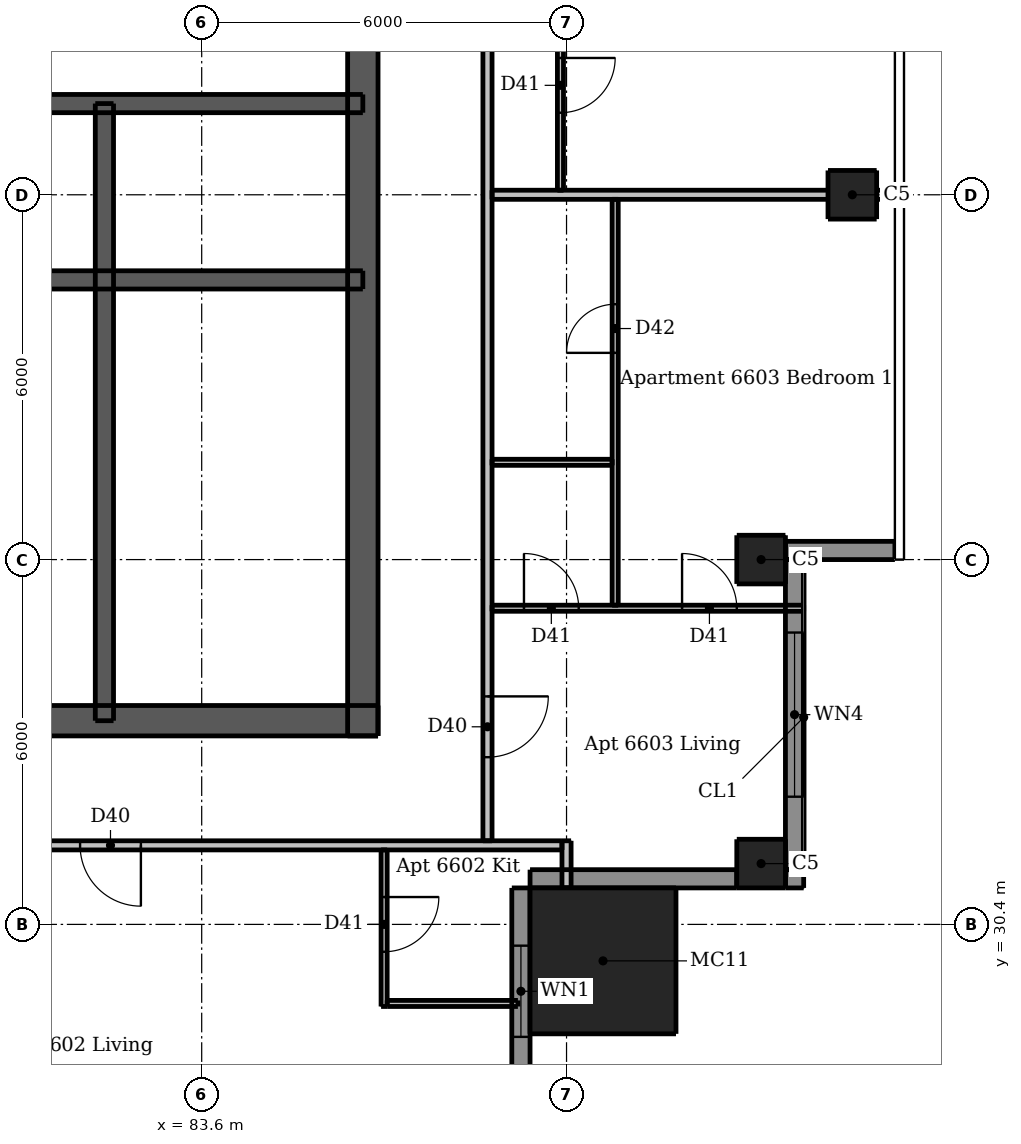
"""IFC4 building model, lengths in metres.
Left out: names, types, materials, properties, quantities, classifications, styles, units other than length and angle.
Written with IfcOpenShell. Run it as: python <this file> out.ifc"""

import sys

from ifc_helpers import new_model, si_unit, direction, frame, frame_2d, origin, origin_2d, place, context, subcontext, project, spatial, rectangle, extrude, element, fill, save


model = new_model("IFC4")
c1 = context("Model", 3, precision=1e-05, world=origin(), true_north=direction((0.0, 1.0)))
c2 = subcontext(c1, "Body", "Model", "MODEL_VIEW")
j1 = project(units=[si_unit("LENGTHUNIT", "METRE"), si_unit("PLANEANGLEUNIT", "RADIAN")], contexts=[c1])
p1 = place(None, origin())
s1 = spatial("IfcSite", under=j1, at=p1, CompositionType="ELEMENT")
p2 = place(p1, origin())
s2 = spatial("IfcBuilding", under=s1, at=p2, CompositionType="ELEMENT")
p3 = place(p2, frame((0.0, 0.0, 248.8)))
s3 = spatial("IfcBuildingStorey", under=s2, at=p3, CompositionType="ELEMENT", Elevation=248.8)
p4 = place(p3, frame((62.5, 33.75, 0.0), z_axis=(0.0, 0.0, 1.0), x_axis=(1.0, 0.0, 0.0)))
e1 = element("IfcWall", 1, at=p4, inside=s3, PredefinedType="SHEAR", context=c2, shape_type="SweptSolid", body=[
    extrude(rectangle(XDim=24.0, YDim=0.5, at=frame_2d((12.0, 0.0))), origin(), (0.0, 0.0, 1.0), 3.05),
])
p5 = place(p4, frame((1.875, 0.0, 0.0)))
e2 = element("IfcOpeningElement", 2, at=p5, cuts=e1, PredefinedType="OPENING", context=c2, shape_type="SweptSolid", body=[
    extrude(rectangle(XDim=1.1, YDim=2.1, at=frame_2d((0.55, 1.05))), frame((0.0, 0.26, 0.0), z_axis=(0.0, -1.0, 0.0), x_axis=(1.0, 0.0, 0.0)), (0.0, 0.0, 1.0), 0.52),
])
p6 = place(p4, frame((21.025, 0.0, 0.0)))
e3 = element("IfcOpeningElement", 3, at=p6, cuts=e1, PredefinedType="OPENING", context=c2, shape_type="SweptSolid", body=[
    extrude(rectangle(XDim=1.1, YDim=2.1, at=frame_2d((0.55, 1.05))), frame((0.0, 0.26, 0.0), z_axis=(0.0, -1.0, 0.0), x_axis=(1.0, 0.0, 0.0)), (0.0, 0.0, 1.0), 0.52),
])
p7 = place(p4, frame((8.0, 0.0, 0.0)))
e4 = element("IfcOpeningElement", 4, at=p7, cuts=e1, PredefinedType="OPENING", context=c2, shape_type="SweptSolid", body=[
    extrude(rectangle(XDim=1.1, YDim=2.1, at=frame_2d((0.55, 1.05))), frame((0.0, 0.26, 0.0), z_axis=(0.0, -1.0, 0.0), x_axis=(1.0, 0.0, 0.0)), (0.0, 0.0, 1.0), 0.52),
])
p8 = place(p4, frame((17.512, 0.0, 0.0)))
e5 = element("IfcOpeningElement", 5, at=p8, cuts=e1, PredefinedType="OPENING", context=c2, shape_type="SweptSolid", body=[
    extrude(rectangle(XDim=0.9, YDim=2.1, at=frame_2d((0.45, 1.05))), frame((0.0, 0.26, 0.0), z_axis=(0.0, -1.0, 0.0), x_axis=(1.0, 0.0, 0.0)), (0.0, 0.0, 1.0), 0.52),
])
p9 = place(p3, frame((86.25, 33.5, 0.0), z_axis=(0.0, 0.0, 1.0), x_axis=(0.0, 1.0, 0.0)))
e6 = element("IfcWall", 6, at=p9, inside=s3, PredefinedType="SHEAR", context=c2, shape_type="SweptSolid", body=[
    extrude(rectangle(XDim=24.0, YDim=0.5, at=frame_2d((12.0, 0.0))), origin(), (0.0, 0.0, 1.0), 3.05),
])
p10 = place(p9, frame((11.2, 0.0, 0.0)))
e7 = element("IfcOpeningElement", 7, at=p10, cuts=e6, PredefinedType="OPENING", context=c2, shape_type="SweptSolid", body=[
    extrude(rectangle(XDim=1.6, YDim=2.1, at=frame_2d((0.8, 1.05))), frame((0.0, 0.26, 0.0), z_axis=(0.0, -1.0, 0.0), x_axis=(1.0, 0.0, 0.0)), (0.0, 0.0, 1.0), 0.52),
])
p11 = place(p3, frame((62.75, 41.0, 0.0), z_axis=(0.0, 0.0, 1.0), x_axis=(1.0, 0.0, 0.0)))
e8 = element("IfcWall", 8, at=p11, inside=s3, PredefinedType="SHEAR", context=c2, shape_type="SweptSolid", body=[
    extrude(rectangle(XDim=23.5, YDim=0.3, at=frame_2d((11.75, 0.0))), origin(), (0.0, 0.0, 1.0), 3.05),
])
p12 = place(p3, frame((62.75, 43.9, 0.0), z_axis=(0.0, 0.0, 1.0), x_axis=(1.0, 0.0, 0.0)))
e9 = element("IfcWall", 9, at=p12, inside=s3, PredefinedType="SHEAR", context=c2, shape_type="SweptSolid", body=[
    extrude(rectangle(XDim=23.5, YDim=0.3, at=frame_2d((11.75, 0.0))), origin(), (0.0, 0.0, 1.0), 3.05),
])
p13 = place(p12, frame((0.762, 0.0, 0.0)))
e10 = element("IfcOpeningElement", 10, at=p13, cuts=e9, PredefinedType="OPENING", context=c2, shape_type="SweptSolid", body=[
    extrude(rectangle(XDim=0.9, YDim=2.1, at=frame_2d((0.45, 1.05))), frame((0.0, 0.16, 0.0), z_axis=(0.0, -1.0, 0.0), x_axis=(1.0, 0.0, 0.0)), (0.0, 0.0, 1.0), 0.32),
])
p14 = place(p12, frame((2.688, 0.0, 0.0)))
e11 = element("IfcOpeningElement", 11, at=p14, cuts=e9, PredefinedType="OPENING", context=c2, shape_type="SweptSolid", body=[
    extrude(rectangle(XDim=0.9, YDim=2.1, at=frame_2d((0.45, 1.05))), frame((0.0, 0.16, 0.0), z_axis=(0.0, -1.0, 0.0), x_axis=(1.0, 0.0, 0.0)), (0.0, 0.0, 1.0), 0.32),
])
p15 = place(p12, frame((20.875, 0.0, 0.0)))
e12 = element("IfcOpeningElement", 12, at=p15, cuts=e9, PredefinedType="OPENING", context=c2, shape_type="SweptSolid", body=[
    extrude(rectangle(XDim=0.9, YDim=2.1, at=frame_2d((0.45, 1.05))), frame((0.0, 0.16, 0.0), z_axis=(0.0, -1.0, 0.0), x_axis=(1.0, 0.0, 0.0)), (0.0, 0.0, 1.0), 0.32),
])
p16 = place(p12, frame((5.05, 0.0, 0.0)))
e13 = element("IfcOpeningElement", 13, at=p16, cuts=e9, PredefinedType="OPENING", context=c2, shape_type="SweptSolid", body=[
    extrude(rectangle(XDim=0.9, YDim=2.1, at=frame_2d((0.45, 1.05))), frame((0.0, 0.16, 0.0), z_axis=(0.0, -1.0, 0.0), x_axis=(1.0, 0.0, 0.0)), (0.0, 0.0, 1.0), 0.32),
])
p17 = place(p12, frame((7.55, 0.0, 0.0)))
e14 = element("IfcOpeningElement", 14, at=p17, cuts=e9, PredefinedType="OPENING", context=c2, shape_type="SweptSolid", body=[
    extrude(rectangle(XDim=0.9, YDim=2.1, at=frame_2d((0.45, 1.05))), frame((0.0, 0.16, 0.0), z_axis=(0.0, -1.0, 0.0), x_axis=(1.0, 0.0, 0.0)), (0.0, 0.0, 1.0), 0.32),
])
p18 = place(p12, frame((12.55, 0.0, 0.0)))
e15 = element("IfcOpeningElement", 15, at=p18, cuts=e9, PredefinedType="OPENING", context=c2, shape_type="SweptSolid", body=[
    extrude(rectangle(XDim=0.9, YDim=2.1, at=frame_2d((0.45, 1.05))), frame((0.0, 0.16, 0.0), z_axis=(0.0, -1.0, 0.0), x_axis=(1.0, 0.0, 0.0)), (0.0, 0.0, 1.0), 0.32),
])
p19 = place(p12, frame((15.05, 0.0, 0.0)))
e16 = element("IfcOpeningElement", 16, at=p19, cuts=e9, PredefinedType="OPENING", context=c2, shape_type="SweptSolid", body=[
    extrude(rectangle(XDim=0.9, YDim=2.1, at=frame_2d((0.45, 1.05))), frame((0.0, 0.16, 0.0), z_axis=(0.0, -1.0, 0.0), x_axis=(1.0, 0.0, 0.0)), (0.0, 0.0, 1.0), 0.32),
])
p20 = place(p3, frame((82.0, 33.75, 0.0), z_axis=(0.0, 0.0, 1.0), x_axis=(0.0, 1.0, 0.0)))
e17 = element("IfcWall", 17, at=p20, inside=s3, PredefinedType="SHEAR", context=c2, shape_type="SweptSolid", body=[
    extrude(rectangle(XDim=10.15, YDim=0.3, at=frame_2d((5.075, 0.0))), origin(), (0.0, 0.0, 1.0), 3.05),
])
for number, where, z_axis, x_axis in (
    (18, (92.8, 31.4, 0.0), (0.0, 0.0, 1.0), (1.0, 0.0, 0.0)),
    (19, (92.8, 36.4, 0.0), (0.0, 0.0, 1.0), (1.0, 0.0, 0.0)),
    (20, (94.3, 42.4, 0.0), (0.0, 0.0, 1.0), (1.0, 0.0, 0.0)),
):
    element("IfcColumn", number, at=place(p3, frame(where, z_axis=z_axis, x_axis=x_axis)), inside=s3, PredefinedType="COLUMN", context=c2, shape_type="SweptSolid", body=[
        extrude(rectangle(XDim=0.8, YDim=0.8, at=origin_2d()), origin(), (0.0, 0.0, 1.0), 3.05),
    ])
p21 = place(p3, frame((90.2, 29.8, 0.0), z_axis=(0.0, 0.0, 1.0), x_axis=(1.0, 0.0, 0.0)))
e21 = element("IfcColumn", 21, at=p21, inside=s3, PredefinedType="COLUMN", context=c2, shape_type="SweptSolid", body=[
    extrude(rectangle(XDim=2.4, YDim=2.4, at=origin_2d()), origin(), (0.0, 0.0, 1.0), 3.3),
])
p22 = place(p3, frame((88.85, 27.6, 0.0), z_axis=(0.0, 0.0, 1.0), x_axis=(0.0, 1.0, 0.0)))
e22 = element("IfcWall", 22, at=p22, inside=s3, PredefinedType="SOLIDWALL", context=c2, shape_type="SweptSolid", body=[
    extrude(rectangle(XDim=3.4, YDim=0.3, at=frame_2d((1.7, 0.0))), origin(), (0.0, 0.0, 1.0), 3.05),
])
p23 = place(p22, frame((0.95, 0.0, 0.9)))
e23 = element("IfcOpeningElement", 23, at=p23, cuts=e22, PredefinedType="OPENING", context=c2, shape_type="SweptSolid", body=[
    extrude(rectangle(XDim=1.5, YDim=1.5, at=frame_2d((0.75, 0.75))), frame((0.0, 0.16, 0.0), z_axis=(0.0, -1.0, 0.0), x_axis=(1.0, 0.0, 0.0)), (0.0, 0.0, 1.0), 0.32),
])
p24 = place(p3, frame((89.0, 31.15, 0.0), z_axis=(0.0, 0.0, 1.0), x_axis=(1.0, 0.0, 0.0)))
e24 = element("IfcWall", 24, at=p24, inside=s3, PredefinedType="SOLIDWALL", context=c2, shape_type="SweptSolid", body=[
    extrude(rectangle(XDim=3.4, YDim=0.3, at=frame_2d((1.7, 0.0))), origin(), (0.0, 0.0, 1.0), 3.05),
])
p25 = place(p3, frame((93.2, 31.15, 0.0), z_axis=(0.0, 0.0, 1.0), x_axis=(1.0, 0.0, 0.0)))
e25 = element("IfcWall", 25, at=p25, inside=s3, PredefinedType="SOLIDWALL", context=c2, shape_type="SweptSolid", body=[
    extrude(rectangle(XDim=0.3, YDim=0.3, at=frame_2d((0.15, 0.0))), origin(), (0.0, 0.0, 1.0), 3.05),
])
p26 = place(p3, frame((93.2, 36.55, 0.0), z_axis=(0.0, 0.0, 1.0), x_axis=(1.0, 0.0, 0.0)))
e26 = element("IfcWall", 26, at=p26, inside=s3, PredefinedType="SOLIDWALL", context=c2, shape_type="SweptSolid", body=[
    extrude(rectangle(XDim=1.8, YDim=0.3, at=frame_2d((0.9, 0.0))), origin(), (0.0, 0.0, 1.0), 3.05),
])
p27 = place(p3, frame((93.35, 31.3, 0.0), z_axis=(0.0, 0.0, 1.0), x_axis=(0.0, 1.0, 0.0)))
e27 = element("IfcWall", 27, at=p27, inside=s3, PredefinedType="SOLIDWALL", context=c2, shape_type="SweptSolid", body=[
    extrude(rectangle(XDim=5.1, YDim=0.3, at=frame_2d((2.55, 0.0))), origin(), (0.0, 0.0, 1.0), 3.05),
])
p28 = place(p27, frame((1.2, 0.0, 0.15)))
e28 = element("IfcOpeningElement", 28, at=p28, cuts=e27, PredefinedType="OPENING", context=c2, shape_type="SweptSolid", body=[
    extrude(rectangle(XDim=2.7, YDim=2.1, at=frame_2d((1.35, 1.05))), frame((0.0, 0.16, 0.0), z_axis=(0.0, -1.0, 0.0), x_axis=(1.0, 0.0, 0.0)), (0.0, 0.0, 1.0), 0.32),
])
p29 = place(p3, frame((86.6, 31.625, 0.0), z_axis=(0.0, 0.0, 1.0), x_axis=(0.0, -1.0, 0.0)))
e29 = element("IfcWall", 29, at=p29, inside=s3, PredefinedType="PARTITIONING", context=c2, shape_type="SweptSolid", body=[
    extrude(rectangle(XDim=2.575, YDim=0.1, at=frame_2d((1.288, 0.0))), origin(), (0.0, 0.0, 1.0), 3.05),
])
p30 = place(p29, frame((0.775, 0.0, 0.0)))
e30 = element("IfcOpeningElement", 30, at=p30, cuts=e29, PredefinedType="OPENING", context=c2, shape_type="SweptSolid", body=[
    extrude(rectangle(XDim=0.9, YDim=2.1, at=frame_2d((0.45, 1.05))), frame((0.0, 0.06, 0.0), z_axis=(0.0, -1.0, 0.0), x_axis=(1.0, 0.0, 0.0)), (0.0, 0.0, 1.0), 0.12),
])
p31 = place(p3, frame((89.5, 60.325, 0.0), z_axis=(0.0, 0.0, 1.0), x_axis=(0.0, -1.0, 0.0)))
e31 = element("IfcWall", 31, at=p31, inside=s3, PredefinedType="PARTITIONING", context=c2, shape_type="SweptSolid", body=[
    extrude(rectangle(XDim=17.85, YDim=0.1, at=frame_2d((8.925, 0.0))), origin(), (0.0, 0.0, 1.0), 3.05),
])
p32 = place(p31, frame((6.975, 0.0, 0.0)))
e32 = element("IfcOpeningElement", 32, at=p32, cuts=e31, PredefinedType="OPENING", context=c2, shape_type="SweptSolid", body=[
    extrude(rectangle(XDim=0.9, YDim=2.1, at=frame_2d((0.45, 1.05))), frame((0.0, 0.06, 0.0), z_axis=(0.0, -1.0, 0.0), x_axis=(1.0, 0.0, 0.0)), (0.0, 0.0, 1.0), 0.12),
])
p33 = place(p31, frame((0.975, 0.0, 0.0)))
e33 = element("IfcOpeningElement", 33, at=p33, cuts=e31, PredefinedType="OPENING", context=c2, shape_type="SweptSolid", body=[
    extrude(rectangle(XDim=0.9, YDim=2.1, at=frame_2d((0.45, 1.05))), frame((0.0, 0.06, 0.0), z_axis=(0.0, -1.0, 0.0), x_axis=(1.0, 0.0, 0.0)), (0.0, 0.0, 1.0), 0.12),
])
p34 = place(p31, frame((15.675, 0.0, 0.0)))
e34 = element("IfcOpeningElement", 34, at=p34, cuts=e31, PredefinedType="OPENING", context=c2, shape_type="SweptSolid", body=[
    extrude(rectangle(XDim=0.9, YDim=2.1, at=frame_2d((0.45, 1.05))), frame((0.0, 0.06, 0.0), z_axis=(0.0, -1.0, 0.0), x_axis=(1.0, 0.0, 0.0)), (0.0, 0.0, 1.0), 0.12),
])
p35 = place(p31, frame((12.725, 0.0, 0.0)))
e35 = element("IfcOpeningElement", 35, at=p35, cuts=e31, PredefinedType="OPENING", context=c2, shape_type="SweptSolid", body=[
    extrude(rectangle(XDim=0.8, YDim=2.1, at=frame_2d((0.4, 1.05))), frame((0.0, 0.06, 0.0), z_axis=(0.0, -1.0, 0.0), x_axis=(1.0, 0.0, 0.0)), (0.0, 0.0, 1.0), 0.12),
])
p36 = place(p3, frame((90.4, 35.65, 0.0), z_axis=(0.0, 0.0, 1.0), x_axis=(0.0, 1.0, 0.0)))
e36 = element("IfcWall", 36, at=p36, inside=s3, PredefinedType="PARTITIONING", context=c2, shape_type="SweptSolid", body=[
    extrude(rectangle(XDim=6.675, YDim=0.1, at=frame_2d((3.337, 0.0))), origin(), (0.0, 0.0, 1.0), 3.05),
])
p37 = place(p36, frame((4.15, 0.0, 0.0)))
e37 = element("IfcOpeningElement", 37, at=p37, cuts=e36, PredefinedType="OPENING", context=c2, shape_type="SweptSolid", body=[
    extrude(rectangle(XDim=0.8, YDim=2.1, at=frame_2d((0.4, 1.05))), frame((0.0, 0.06, 0.0), z_axis=(0.0, -1.0, 0.0), x_axis=(1.0, 0.0, 0.0)), (0.0, 0.0, 1.0), 0.12),
])
p38 = place(p3, frame((88.375, 38.0, 0.0), z_axis=(0.0, 0.0, 1.0), x_axis=(1.0, 0.0, 0.0)))
e38 = element("IfcWall", 38, at=p38, inside=s3, PredefinedType="PARTITIONING", context=c2, shape_type="SweptSolid", body=[
    extrude(rectangle(XDim=1.975, YDim=0.1, at=frame_2d((0.988, 0.0))), origin(), (0.0, 0.0, 1.0), 3.05),
])
p39 = place(p3, frame((88.375, 35.6, 0.0), z_axis=(0.0, 0.0, 1.0), x_axis=(1.0, 0.0, 0.0)))
e39 = element("IfcWall", 39, at=p39, inside=s3, PredefinedType="PARTITIONING", context=c2, shape_type="SweptSolid", body=[
    extrude(rectangle(XDim=5.125, YDim=0.1, at=frame_2d((2.562, 0.0))), origin(), (0.0, 0.0, 1.0), 3.05),
])
p40 = place(p39, frame((0.525, 0.0, 0.0)))
e40 = element("IfcOpeningElement", 40, at=p40, cuts=e39, PredefinedType="OPENING", context=c2, shape_type="SweptSolid", body=[
    extrude(rectangle(XDim=0.9, YDim=2.1, at=frame_2d((0.45, 1.05))), frame((0.0, 0.06, 0.0), z_axis=(0.0, -1.0, 0.0), x_axis=(1.0, 0.0, 0.0)), (0.0, 0.0, 1.0), 0.12),
])
p41 = place(p39, frame((3.125, 0.0, 0.0)))
e41 = element("IfcOpeningElement", 41, at=p41, cuts=e39, PredefinedType="OPENING", context=c2, shape_type="SweptSolid", body=[
    extrude(rectangle(XDim=0.9, YDim=2.1, at=frame_2d((0.45, 1.05))), frame((0.0, 0.06, 0.0), z_axis=(0.0, -1.0, 0.0), x_axis=(1.0, 0.0, 0.0)), (0.0, 0.0, 1.0), 0.12),
])
p42 = place(p3, frame((86.65, 29.1, 0.0), z_axis=(0.0, 0.0, 1.0), x_axis=(1.0, 0.0, 0.0)))
e42 = element("IfcWall", 42, at=p42, inside=s3, PredefinedType="PARTITIONING", context=c2, shape_type="SweptSolid", body=[
    extrude(rectangle(XDim=2.15, YDim=0.1, at=frame_2d((1.075, 0.0))), origin(), (0.0, 0.0, 1.0), 3.05),
])
p43 = place(p3, frame((88.3, 61.175, 0.0), z_axis=(0.0, 0.0, 1.0), x_axis=(0.0, -1.0, 0.0)))
e43 = element("IfcWall", 43, at=p43, inside=s3, PredefinedType="PARTITIONING", context=c2, shape_type="SweptSolid", body=[
    extrude(rectangle(XDim=29.4, YDim=0.15, at=frame_2d((14.7, 0.0))), origin(), (0.0, 0.0, 1.0), 3.05),
])
p44 = place(p43, frame((27.025, 0.0, 0.0)))
e44 = element("IfcOpeningElement", 44, at=p44, cuts=e43, PredefinedType="OPENING", context=c2, shape_type="SweptSolid", body=[
    extrude(rectangle(XDim=1.0, YDim=2.1, at=frame_2d((0.5, 1.05))), frame((0.0, 0.085, 0.0), z_axis=(0.0, -1.0, 0.0), x_axis=(1.0, 0.0, 0.0)), (0.0, 0.0, 1.0), 0.17),
])
p45 = place(p43, frame((9.275, 0.0, 0.0)))
e45 = element("IfcOpeningElement", 45, at=p45, cuts=e43, PredefinedType="OPENING", context=c2, shape_type="SweptSolid", body=[
    extrude(rectangle(XDim=1.0, YDim=2.1, at=frame_2d((0.5, 1.05))), frame((0.0, 0.085, 0.0), z_axis=(0.0, -1.0, 0.0), x_axis=(1.0, 0.0, 0.0)), (0.0, 0.0, 1.0), 0.17),
])
p46 = place(p3, frame((89.6, 31.0, 0.0), z_axis=(0.0, 0.0, 1.0), x_axis=(0.0, 1.0, 0.0)))
e46 = element("IfcWall", 46, at=p46, inside=s3, PredefinedType="PARTITIONING", context=c2, shape_type="SweptSolid", body=[
    extrude(rectangle(XDim=0.775, YDim=0.15, at=frame_2d((0.387, 0.0))), origin(), (0.0, 0.0, 1.0), 3.05),
])
p47 = place(p3, frame((88.375, 42.4, 0.0), z_axis=(0.0, 0.0, 1.0), x_axis=(1.0, 0.0, 0.0)))
e47 = element("IfcWall", 47, at=p47, inside=s3, PredefinedType="PARTITIONING", context=c2, shape_type="SweptSolid", body=[
    extrude(rectangle(XDim=6.625, YDim=0.15, at=frame_2d((3.312, 0.0))), origin(), (0.0, 0.0, 1.0), 2.59),
])
p48 = place(p3, frame((89.525, 31.7, 0.0), z_axis=(0.0, 0.0, 1.0), x_axis=(-1.0, 0.0, 0.0)))
e48 = element("IfcWall", 48, at=p48, inside=s3, PredefinedType="PARTITIONING", context=c2, shape_type="SweptSolid", body=[
    extrude(rectangle(XDim=30.55, YDim=0.15, at=frame_2d((15.275, 0.0))), origin(), (0.0, 0.0, 1.0), 3.05),
])
p49 = place(p48, frame((26.775, 0.0, 0.0)))
e49 = element("IfcOpeningElement", 49, at=p49, cuts=e48, PredefinedType="OPENING", context=c2, shape_type="SweptSolid", body=[
    extrude(rectangle(XDim=1.0, YDim=2.1, at=frame_2d((0.5, 1.05))), frame((0.0, 0.085, 0.0), z_axis=(0.0, -1.0, 0.0), x_axis=(1.0, 0.0, 0.0)), (0.0, 0.0, 1.0), 0.17),
])
p50 = place(p48, frame((6.925, 0.0, 0.0)))
e50 = element("IfcOpeningElement", 50, at=p50, cuts=e48, PredefinedType="OPENING", context=c2, shape_type="SweptSolid", body=[
    extrude(rectangle(XDim=1.0, YDim=2.1, at=frame_2d((0.5, 1.05))), frame((0.0, 0.085, 0.0), z_axis=(0.0, -1.0, 0.0), x_axis=(1.0, 0.0, 0.0)), (0.0, 0.0, 1.0), 0.17),
])
p51 = place(p23, origin())
e51 = element("IfcWindow", 51, at=p51, inside=s3, PartitioningType="DOUBLE_PANEL_VERTICAL", PredefinedType="WINDOW", context=c2, shape_type="SweptSolid", body=[
    extrude(rectangle(XDim=1.5, YDim=1.5, at=frame_2d((0.75, 0.75))), frame((0.0, 0.03, 0.0), z_axis=(0.0, -1.0, 0.0), x_axis=(1.0, 0.0, 0.0)), (0.0, 0.0, 1.0), 0.06),
])
fill(e23, e51)
p52 = place(p28, origin())
e52 = element("IfcWindow", 52, at=p52, inside=s3, PartitioningType="DOUBLE_PANEL_VERTICAL", PredefinedType="WINDOW", context=c2, shape_type="SweptSolid", body=[
    extrude(rectangle(XDim=2.7, YDim=2.1, at=frame_2d((1.35, 1.05))), frame((0.0, 0.03, 0.0), z_axis=(0.0, -1.0, 0.0), x_axis=(1.0, 0.0, 0.0)), (0.0, 0.0, 1.0), 0.06),
])
fill(e28, e52)
p53 = place(p6, origin())
e53 = element("IfcDoor", 53, at=p53, inside=s3, OperationType="SINGLE_SWING_RIGHT", PredefinedType="DOOR", context=c2, shape_type="SweptSolid", body=[
    extrude(rectangle(XDim=1.1, YDim=2.1, at=frame_2d((0.55, 1.05))), frame((0.0, 0.237, 0.0), z_axis=(0.0, -1.0, 0.0), x_axis=(1.0, 0.0, 0.0)), (0.0, 0.0, 1.0), 0.05),
])
fill(e3, e53)
p54 = place(p10, origin())
e54 = element("IfcDoor", 54, at=p54, inside=s3, OperationType="DOUBLE_DOOR_SINGLE_SWING", PredefinedType="DOOR", context=c2, shape_type="SweptSolid", body=[
    extrude(rectangle(XDim=1.6, YDim=2.1, at=frame_2d((0.8, 1.05))), frame((0.0, 0.237, 0.0), z_axis=(0.0, -1.0, 0.0), x_axis=(1.0, 0.0, 0.0)), (0.0, 0.0, 1.0), 0.05),
])
fill(e7, e54)
p55 = place(p15, origin())
e55 = element("IfcDoor", 55, at=p55, inside=s3, OperationType="SINGLE_SWING_LEFT", PredefinedType="DOOR", context=c2, shape_type="SweptSolid", body=[
    extrude(rectangle(XDim=0.9, YDim=2.1, at=frame_2d((0.45, 1.05))), frame((0.0, -0.087, 0.0), z_axis=(0.0, -1.0, 0.0), x_axis=(1.0, 0.0, 0.0)), (0.0, 0.0, 1.0), 0.05),
])
fill(e12, e55)
p56 = place(p50, origin())
e56 = element("IfcDoor", 56, at=p56, inside=s3, OperationType="SINGLE_SWING_LEFT", PredefinedType="DOOR", context=c2, shape_type="SweptSolid", body=[
    extrude(rectangle(XDim=1.0, YDim=2.1, at=frame_2d((0.5, 1.05))), frame((0.0, 0.025, 0.0), z_axis=(0.0, -1.0, 0.0), x_axis=(1.0, 0.0, 0.0)), (0.0, 0.0, 1.0), 0.05),
])
fill(e50, e56)
p57 = place(p30, origin())
e57 = element("IfcDoor", 57, at=p57, inside=s3, OperationType="SINGLE_SWING_LEFT", PredefinedType="DOOR", context=c2, shape_type="SweptSolid", body=[
    extrude(rectangle(XDim=0.9, YDim=2.1, at=frame_2d((0.45, 1.05))), frame((0.0, 0.025, 0.0), z_axis=(0.0, -1.0, 0.0), x_axis=(1.0, 0.0, 0.0)), (0.0, 0.0, 1.0), 0.05),
])
fill(e30, e57)
p58 = place(p44, origin())
e58 = element("IfcDoor", 58, at=p58, inside=s3, OperationType="SINGLE_SWING_LEFT", PredefinedType="DOOR", context=c2, shape_type="SweptSolid", body=[
    extrude(rectangle(XDim=1.0, YDim=2.1, at=frame_2d((0.5, 1.05))), frame((0.0, 0.025, 0.0), z_axis=(0.0, -1.0, 0.0), x_axis=(1.0, 0.0, 0.0)), (0.0, 0.0, 1.0), 0.05),
])
fill(e44, e58)
p59 = place(p40, origin())
e59 = element("IfcDoor", 59, at=p59, inside=s3, OperationType="SINGLE_SWING_LEFT", PredefinedType="DOOR", context=c2, shape_type="SweptSolid", body=[
    extrude(rectangle(XDim=0.9, YDim=2.1, at=frame_2d((0.45, 1.05))), frame((0.0, 0.025, 0.0), z_axis=(0.0, -1.0, 0.0), x_axis=(1.0, 0.0, 0.0)), (0.0, 0.0, 1.0), 0.05),
])
fill(e40, e59)
p60 = place(p41, origin())
e60 = element("IfcDoor", 60, at=p60, inside=s3, OperationType="SINGLE_SWING_LEFT", PredefinedType="DOOR", context=c2, shape_type="SweptSolid", body=[
    extrude(rectangle(XDim=0.9, YDim=2.1, at=frame_2d((0.45, 1.05))), frame((0.0, 0.025, 0.0), z_axis=(0.0, -1.0, 0.0), x_axis=(1.0, 0.0, 0.0)), (0.0, 0.0, 1.0), 0.05),
])
fill(e41, e60)
p61 = place(p37, origin())
e61 = element("IfcDoor", 61, at=p61, inside=s3, OperationType="SINGLE_SWING_LEFT", PredefinedType="DOOR", context=c2, shape_type="SweptSolid", body=[
    extrude(rectangle(XDim=0.8, YDim=2.1, at=frame_2d((0.4, 1.05))), frame((0.0, 0.025, 0.0), z_axis=(0.0, -1.0, 0.0), x_axis=(1.0, 0.0, 0.0)), (0.0, 0.0, 1.0), 0.05),
])
fill(e37, e61)
p62 = place(p34, origin())
e62 = element("IfcDoor", 62, at=p62, inside=s3, OperationType="SINGLE_SWING_LEFT", PredefinedType="DOOR", context=c2, shape_type="SweptSolid", body=[
    extrude(rectangle(XDim=0.9, YDim=2.1, at=frame_2d((0.45, 1.05))), frame((0.0, 0.025, 0.0), z_axis=(0.0, -1.0, 0.0), x_axis=(1.0, 0.0, 0.0)), (0.0, 0.0, 1.0), 0.05),
])
fill(e34, e62)
save(model, sys.argv[1])
